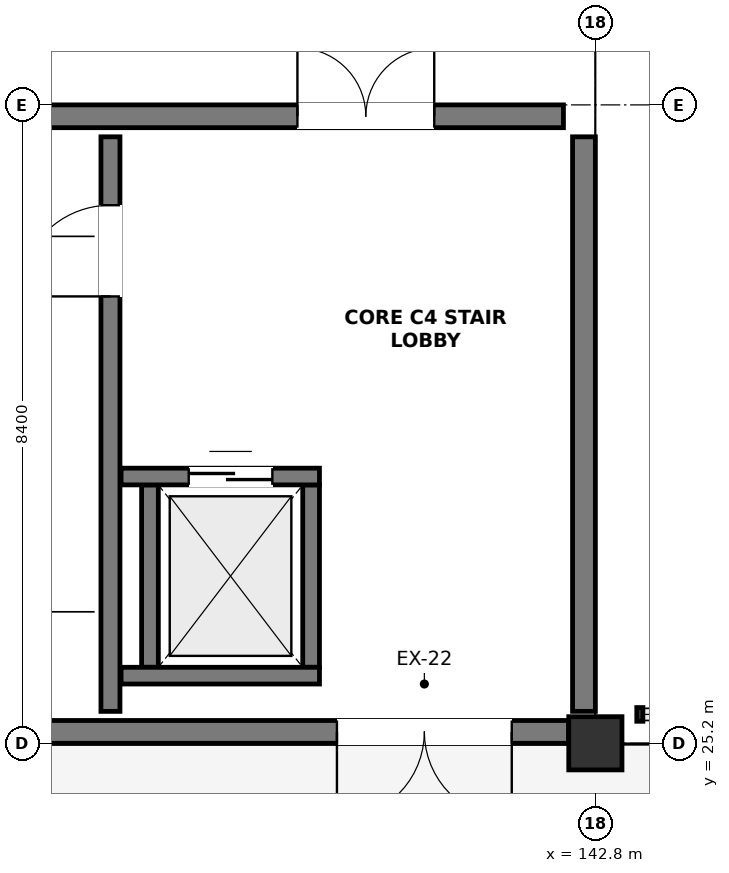
"""IFC4 building model, lengths in metres.
Left out: names, types, materials, properties, quantities, classifications, styles, units other than length and angle.
Written with IfcOpenShell. Run it as: python <this file> out.ifc"""

import sys

from ifc_helpers import new_model, si_unit, direction, frame, frame_2d, origin, origin_2d, place, context, subcontext, project, spatial, rectangle, extrude, element, fill, save


model = new_model("IFC4")
c1 = context("Model", 3, precision=1e-05, world=origin(), true_north=direction((0.0, 1.0)))
c2 = subcontext(c1, "Body", "Model", "MODEL_VIEW")
j1 = project(units=[si_unit("LENGTHUNIT", "METRE"), si_unit("PLANEANGLEUNIT", "RADIAN")], contexts=[c1])
p1 = place(None, origin())
s1 = spatial("IfcSite", under=j1, at=p1, CompositionType="ELEMENT")
p2 = place(p1, origin())
s2 = spatial("IfcBuilding", under=s1, at=p2, CompositionType="ELEMENT")
p3 = place(p2, origin())
s3 = spatial("IfcBuildingStorey", under=s2, at=p3, CompositionType="ELEMENT", Elevation=0.0)
p4 = place(p3, frame((142.8, 25.2, 0.0), z_axis=(0.0, 0.0, 1.0), x_axis=(1.0, 0.0, 0.0)))
e1 = element("IfcColumn", 1, at=p4, inside=s3, PredefinedType="COLUMN", context=c2, shape_type="SweptSolid", body=[
    extrude(rectangle(XDim=0.7, YDim=0.7, at=origin_2d()), origin(), (0.0, 0.0, 1.0), 5.1),
])
p5 = place(p3, frame((126.352, 25.35, 0.0), z_axis=(0.0, 0.0, 1.0), x_axis=(1.0, 0.0, 0.0)))
e2 = element("IfcWall", 2, at=p5, inside=s3, PredefinedType="SHEAR", context=c2, shape_type="SweptSolid", body=[
    extrude(rectangle(XDim=16.096, YDim=0.3, at=frame_2d((8.048, 0.0))), origin(), (0.0, 0.0, 1.0), 4.7),
])
p6 = place(p5, frame((13.048, 0.0, 0.0)))
e3 = element("IfcOpeningElement", 3, at=p6, cuts=e2, PredefinedType="OPENING", context=c2, shape_type="SweptSolid", body=[
    extrude(rectangle(XDim=2.3, YDim=2.4, at=frame_2d((1.15, 1.2))), frame((0.0, 0.162, 0.0), z_axis=(0.0, -1.0, 0.0), x_axis=(1.0, 0.0, 0.0)), (0.0, 0.0, 1.0), 0.324),
])
p7 = place(p3, frame((126.45, 33.45, 0.0), z_axis=(0.0, 0.0, 1.0), x_axis=(1.0, 0.0, 0.0)))
e4 = element("IfcWall", 4, at=p7, inside=s3, PredefinedType="SHEAR", context=c2, shape_type="SweptSolid", body=[
    extrude(rectangle(XDim=15.93, YDim=0.3, at=frame_2d((7.965, 0.0))), origin(), (0.0, 0.0, 1.0), 4.7),
])
p8 = place(p7, frame((12.43, 0.0, 0.0)))
e5 = element("IfcOpeningElement", 5, at=p8, cuts=e4, PredefinedType="OPENING", context=c2, shape_type="SweptSolid", body=[
    extrude(rectangle(XDim=1.8, YDim=2.2, at=frame_2d((0.9, 1.1))), frame((0.0, 0.162, 0.0), z_axis=(0.0, -1.0, 0.0), x_axis=(1.0, 0.0, 0.0)), (0.0, 0.0, 1.0), 0.324),
])
p9 = place(p3, frame((142.65, 25.62, 0.0), z_axis=(0.0, 0.0, 1.0), x_axis=(0.0, 1.0, 0.0)))
e6 = element("IfcWall", 6, at=p9, inside=s3, PredefinedType="SHEAR", context=c2, shape_type="SweptSolid", body=[
    extrude(rectangle(XDim=7.56, YDim=0.3, at=frame_2d((3.78, 0.0))), origin(), (0.0, 0.0, 1.0), 4.7),
])
p10 = place(p3, frame((136.42, 25.62, 0.0), z_axis=(0.0, 0.0, 1.0), x_axis=(0.0, 1.0, 0.0)))
e7 = element("IfcWall", 7, at=p10, inside=s3, PredefinedType="SHEAR", context=c2, shape_type="SweptSolid", body=[
    extrude(rectangle(XDim=7.56, YDim=0.25, at=frame_2d((3.78, 0.0))), origin(), (0.0, 0.0, 1.0), 4.7),
])
p11 = place(p10, frame((5.46, 0.0, 0.0)))
e8 = element("IfcOpeningElement", 8, at=p11, cuts=e7, PredefinedType="OPENING", context=c2, shape_type="SweptSolid", body=[
    extrude(rectangle(XDim=1.2, YDim=2.2, at=frame_2d((0.6, 1.1))), frame((0.0, 0.137, 0.0), z_axis=(0.0, -1.0, 0.0), x_axis=(1.0, 0.0, 0.0)), (0.0, 0.0, 1.0), 0.274),
])
for number, where, z_axis, x_axis in (
    (9, (136.94, 26.2, 0.0), (0.0, 0.0, 1.0), (0.0, 1.0, 0.0)),
    (10, (139.06, 26.2, 0.0), (0.0, 0.0, 1.0), (0.0, 1.0, 0.0)),
):
    element("IfcWall", number, at=place(p3, frame(where, z_axis=z_axis, x_axis=x_axis)), inside=s3, PredefinedType="SOLIDWALL", context=c2, shape_type="SweptSolid", body=[
        extrude(rectangle(XDim=2.4, YDim=0.22, at=frame_2d((1.2, 0.0))), origin(), (0.0, 0.0, 1.0), 4.7),
    ])
p12 = place(p3, frame((136.56, 26.09, 0.0), z_axis=(0.0, 0.0, 1.0), x_axis=(1.0, 0.0, 0.0)))
e11 = element("IfcWall", 11, at=p12, inside=s3, PredefinedType="SOLIDWALL", context=c2, shape_type="SweptSolid", body=[
    extrude(rectangle(XDim=2.61, YDim=0.22, at=frame_2d((1.305, 0.0))), origin(), (0.0, 0.0, 1.0), 4.7),
])
p13 = place(p3, frame((136.56, 28.71, 0.0), z_axis=(0.0, 0.0, 1.0), x_axis=(1.0, 0.0, 0.0)))
e12 = element("IfcWall", 12, at=p13, inside=s3, PredefinedType="SOLIDWALL", context=c2, shape_type="SweptSolid", body=[
    extrude(rectangle(XDim=2.61, YDim=0.22, at=frame_2d((1.305, 0.0))), origin(), (0.0, 0.0, 1.0), 4.7),
])
p14 = place(p13, frame((0.89, 0.0, 0.0)))
e13 = element("IfcOpeningElement", 13, at=p14, cuts=e12, PredefinedType="OPENING", context=c2, shape_type="SweptSolid", body=[
    extrude(rectangle(XDim=1.1, YDim=2.15, at=frame_2d((0.55, 1.075))), frame((0.0, 0.122, 0.0), z_axis=(0.0, -1.0, 0.0), x_axis=(1.0, 0.0, 0.0)), (0.0, 0.0, 1.0), 0.244),
])
p15 = place(p6, frame((2.3, 0.0, 0.0), z_axis=(0.0, 0.0, 1.0), x_axis=(-1.0, 0.0, 0.0)))
e14 = element("IfcDoor", 14, at=p15, inside=s3, OperationType="DOUBLE_DOOR_SINGLE_SWING", PredefinedType="DOOR", context=c2, shape_type="SweptSolid", body=[
    extrude(rectangle(XDim=2.3, YDim=2.4, at=frame_2d((1.15, 1.2))), frame((0.0, 0.025, 0.0), z_axis=(0.0, -1.0, 0.0), x_axis=(1.0, 0.0, 0.0)), (0.0, 0.0, 1.0), 0.05),
])
fill(e3, e14)
p16 = place(p8, origin())
e15 = element("IfcDoor", 15, at=p16, inside=s3, OperationType="DOUBLE_DOOR_SINGLE_SWING", PredefinedType="DOOR", context=c2, shape_type="SweptSolid", body=[
    extrude(rectangle(XDim=1.8, YDim=2.2, at=frame_2d((0.9, 1.1))), frame((0.0, 0.025, 0.0), z_axis=(0.0, -1.0, 0.0), x_axis=(1.0, 0.0, 0.0)), (0.0, 0.0, 1.0), 0.05),
])
fill(e5, e15)
p17 = place(p11, origin())
e16 = element("IfcDoor", 16, at=p17, inside=s3, OperationType="SINGLE_SWING_LEFT", PredefinedType="DOOR", context=c2, shape_type="SweptSolid", body=[
    extrude(rectangle(XDim=1.2, YDim=2.2, at=frame_2d((0.6, 1.1))), frame((0.0, 0.025, 0.0), z_axis=(0.0, -1.0, 0.0), x_axis=(1.0, 0.0, 0.0)), (0.0, 0.0, 1.0), 0.05),
])
fill(e8, e16)
p18 = place(p14, origin())
e17 = element("IfcDoor", 17, at=p18, inside=s3, OperationType="DOUBLE_DOOR_SLIDING", PredefinedType="DOOR", context=c2, shape_type="SweptSolid", body=[
    extrude(rectangle(XDim=1.1, YDim=2.15, at=frame_2d((0.55, 1.075))), frame((0.0, 0.025, 0.0), z_axis=(0.0, -1.0, 0.0), x_axis=(1.0, 0.0, 0.0)), (0.0, 0.0, 1.0), 0.05),
])
fill(e13, e17)
save(model, sys.argv[1])
